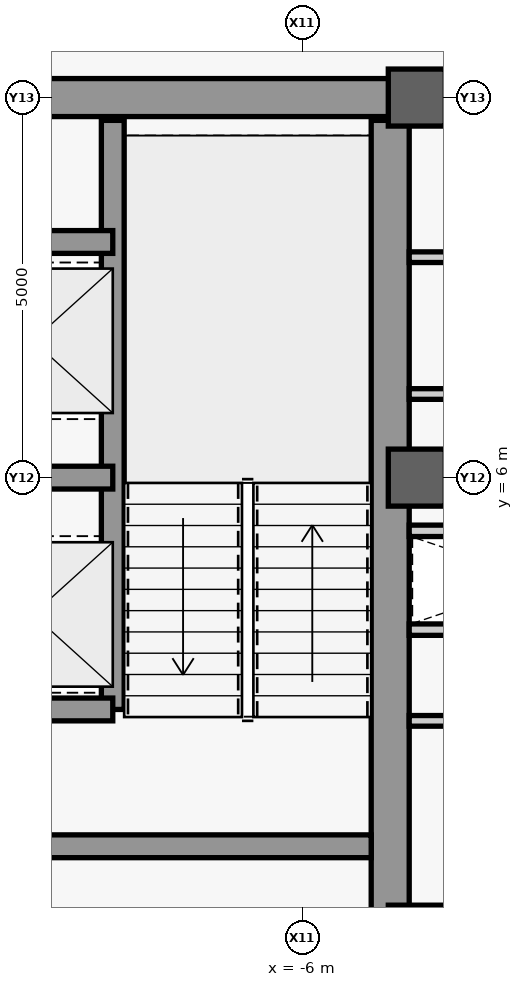
"""IFC4 building model, lengths in metres.
Left out: names, types, materials, properties, quantities, classifications, styles, units other than length and angle.
Written with IfcOpenShell. Run it as: python <this file> out.ifc"""

import sys

from ifc_helpers import new_model, si_unit, direction, frame, frame_2d, origin, origin_2d, place, context, subcontext, project, spatial, rectangle, extrude, source, transform, mapped, element, save


model = new_model("IFC4")
c1 = context("Model", 3, precision=1e-05, world=origin(), true_north=direction((0.0, 1.0)))
c2 = subcontext(c1, "Body", "Model", "MODEL_VIEW")
j1 = project(units=[si_unit("LENGTHUNIT", "METRE"), si_unit("PLANEANGLEUNIT", "RADIAN")], contexts=[c1])
p1 = place(None, origin())
s1 = spatial("IfcSite", under=j1, at=p1, CompositionType="ELEMENT")
p2 = place(p1, origin())
s2 = spatial("IfcBuilding", under=s1, at=p2, CompositionType="ELEMENT")
p3 = place(p2, frame((0.0, 0.0, 358.3)))
s3 = spatial("IfcBuildingStorey", under=s2, at=p3, CompositionType="ELEMENT", Elevation=358.3)
m1 = source(origin(), c2, "Body", "SweptSolid", [
    extrude(rectangle(XDim=21.4, YDim=0.5, at=frame_2d((10.7, 0.0))), origin(), (0.0, 0.0, 1.0), 3.74),
])
p4 = place(p3, frame((-4.85, -10.7, 0.0), z_axis=(0.0, 0.0, 1.0), x_axis=(0.0, 1.0, 0.0)))
e1 = element("IfcWall", 1, at=p4, inside=s3, PredefinedType="SHEAR", context=c2, shape_type="MappedRepresentation", body=[
    mapped(m1, transform((0.0, 0.0, 0.0), scale=1.0)),
])
m2 = source(origin(), c2, "Body", "SweptSolid", [
    extrude(rectangle(XDim=5.9, YDim=0.5, at=frame_2d((2.95, 0.0))), origin(), (0.0, 0.0, 1.0), 3.74),
])
p5 = place(p3, frame((-10.75, 11.0, 0.0), z_axis=(0.0, 0.0, 1.0), x_axis=(1.0, 0.0, 0.0)))
e2 = element("IfcWall", 2, at=p5, inside=s3, PredefinedType="SHEAR", context=c2, shape_type="MappedRepresentation", body=[
    mapped(m2, transform((0.0, 0.0, 0.0), scale=1.0)),
])
m3 = source(origin(), c2, "Body", "SweptSolid", [
    extrude(rectangle(XDim=5.65, YDim=0.3, at=frame_2d((2.825, 0.0))), origin(), (0.0, 0.0, 1.0), 3.74),
])
p6 = place(p3, frame((-10.75, 1.15, 0.0), z_axis=(0.0, 0.0, 1.0), x_axis=(1.0, 0.0, 0.0)))
e3 = element("IfcWall", 3, at=p6, inside=s3, PredefinedType="SHEAR", context=c2, shape_type="MappedRepresentation", body=[
    mapped(m3, transform((0.0, 0.0, 0.0), scale=1.0)),
])
m4 = source(origin(), c2, "Body", "SweptSolid", [
    extrude(rectangle(XDim=9.2, YDim=0.5, at=frame_2d((4.6, 0.0))), origin(), (0.0, 0.0, 1.0), 3.74),
])
p7 = place(p3, frame((-4.6, 11.0, 0.0), z_axis=(0.0, 0.0, 1.0), x_axis=(1.0, 0.0, 0.0)))
e4 = element("IfcWall", 4, at=p7, inside=s3, PredefinedType="SHEAR", context=c2, shape_type="MappedRepresentation", body=[
    mapped(m4, transform((0.0, 0.0, 0.0), scale=1.0)),
])
m5 = source(origin(), c2, "Body", "SweptSolid", [
    extrude(rectangle(XDim=0.75, YDim=0.75, at=origin_2d()), origin(), (0.0, 0.0, 1.0), 4.0),
])
for number, where, z_axis, x_axis in (
    (5, (-4.5, 0.0, 0.0), (0.0, 0.0, 1.0), (1.0, 0.0, 0.0)),
    (6, (-4.5, 6.0, 0.0), (0.0, 0.0, 1.0), (1.0, 0.0, 0.0)),
    (7, (-4.5, 11.0, 0.0), (0.0, 0.0, 1.0), (1.0, 0.0, 0.0)),
):
    element("IfcColumn", number, at=place(p3, frame(where, z_axis=z_axis, x_axis=x_axis)), inside=s3, PredefinedType="COLUMN", context=c2, shape_type="MappedRepresentation", body=[
        mapped(m5, transform((0.0, 0.0, 0.0), scale=1.0)),
    ])
m6 = source(origin(), c2, "Body", "SweptSolid", [
    extrude(rectangle(XDim=7.75, YDim=0.3, at=frame_2d((3.875, 0.0))), origin(), (0.0, 0.0, 1.0), 3.74),
])
p8 = place(p3, frame((-8.5, 2.95, 0.0), z_axis=(0.0, 0.0, 1.0), x_axis=(0.0, 1.0, 0.0)))
e8 = element("IfcWall", 8, at=p8, inside=s3, PredefinedType="SHEAR", context=c2, shape_type="MappedRepresentation", body=[
    mapped(m6, transform((0.0, 0.0, 0.0), scale=1.0)),
])
m7 = source(origin(), c2, "Body", "SweptSolid", [
    extrude(rectangle(XDim=2.2, YDim=0.3, at=frame_2d((1.1, 0.0))), origin(), (0.0, 0.0, 1.0), 3.74),
])
for number, where, z_axis, x_axis in (
    (9, (-10.7, 2.95, 0.0), (0.0, 0.0, 1.0), (1.0, 0.0, 0.0)),
    (10, (-10.7, 6.0, 0.0), (0.0, 0.0, 1.0), (1.0, 0.0, 0.0)),
    (11, (-10.7, 9.1, 0.0), (0.0, 0.0, 1.0), (1.0, 0.0, 0.0)),
):
    element("IfcWall", number, at=place(p3, frame(where, z_axis=z_axis, x_axis=x_axis)), inside=s3, PredefinedType="SHEAR", context=c2, shape_type="MappedRepresentation", body=[
        mapped(m7, transform((0.0, 0.0, 0.0), scale=1.0)),
    ])
m8 = source(origin(), c2, "Body", "SweptSolid", [
    extrude(rectangle(XDim=3.45, YDim=0.15, at=frame_2d((1.725, 0.0))), origin(), (0.0, 0.0, 1.0), 3.74),
])
p9 = place(p3, frame((-4.6, 4.0, 0.0), z_axis=(0.0, 0.0, 1.0), x_axis=(1.0, 0.0, 0.0)))
e12 = element("IfcWall", 12, at=p9, inside=s3, PredefinedType="PARTITIONING", context=c2, shape_type="MappedRepresentation", body=[
    mapped(m8, transform((0.0, 0.0, 0.0), scale=1.0)),
])
m9 = source(origin(), c2, "Body", "SweptSolid", [
    extrude(rectangle(XDim=3.45, YDim=0.14, at=frame_2d((1.725, 0.0))), origin(), (0.0, 0.0, 1.0), 3.74),
])
for number, where, z_axis, x_axis in (
    (13, (-4.6, 7.1, 0.0), (0.0, 0.0, 1.0), (1.0, 0.0, 0.0)),
    (14, (-4.6, 8.9, 0.0), (0.0, 0.0, 1.0), (1.0, 0.0, 0.0)),
):
    element("IfcWall", number, at=place(p3, frame(where, z_axis=z_axis, x_axis=x_axis)), inside=s3, PredefinedType="PARTITIONING", context=c2, shape_type="MappedRepresentation", body=[
        mapped(m9, transform((0.0, 0.0, 0.0), scale=1.0)),
    ])
p10 = place(p3, frame((-4.6, 5.3, 0.0), z_axis=(0.0, 0.0, 1.0), x_axis=(1.0, 0.0, 0.0)))
e15 = element("IfcWall", 15, at=p10, inside=s3, PredefinedType="PARTITIONING", context=c2, shape_type="MappedRepresentation", body=[
    mapped(m8, transform((0.0, 0.0, 0.0), scale=1.0)),
])
p11 = place(p3, frame((-4.6, 2.8, 0.0), z_axis=(0.0, 0.0, 1.0), x_axis=(1.0, 0.0, 0.0)))
e16 = element("IfcWall", 16, at=p11, inside=s3, PredefinedType="PARTITIONING", context=c2, shape_type="MappedRepresentation", body=[
    mapped(m9, transform((0.0, 0.0, 0.0), scale=1.0)),
])
save(model, sys.argv[1])
